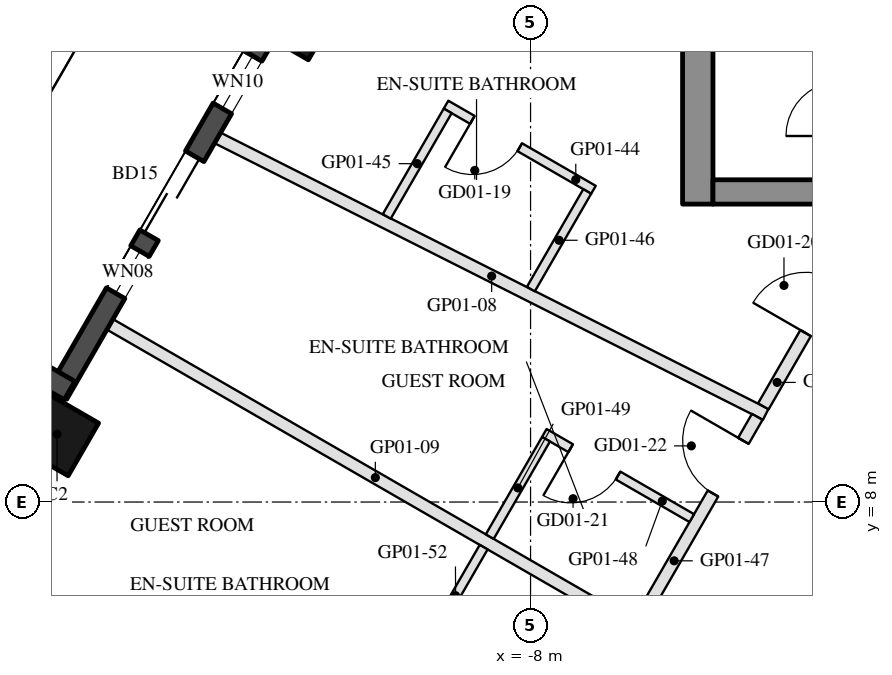
"""IFC4 building model, lengths in metres.
Left out: names, types, materials, properties, quantities, classifications, styles, units other than length and angle.
Written with IfcOpenShell. Run it as: python <this file> out.ifc"""

import sys

from ifc_helpers import new_model, si_unit, direction, frame, frame_2d, origin, origin_2d, place, context, subcontext, project, spatial, rectangle, hollow_rectangle, extrude, element, fill, save


model = new_model("IFC4")
c1 = context("Model", 3, precision=1e-05, world=origin(), true_north=direction((0.0, 1.0)))
c2 = subcontext(c1, "Body", "Model", "MODEL_VIEW")
j1 = project(units=[si_unit("LENGTHUNIT", "METRE"), si_unit("PLANEANGLEUNIT", "RADIAN")], contexts=[c1])
p1 = place(None, origin())
s1 = spatial("IfcSite", under=j1, at=p1, CompositionType="ELEMENT")
p2 = place(p1, origin())
s2 = spatial("IfcBuilding", under=s1, at=p2, CompositionType="ELEMENT")
p3 = place(p2, frame((0.0, 0.0, 46.5)))
s3 = spatial("IfcBuildingStorey", under=s2, at=p3, CompositionType="ELEMENT", Elevation=46.5)
for number, where, z_axis, x_axis in (
    (1, (-11.838, 15.957, 0.0), (0.0, 0.0, 1.0), (0.5, 0.866, 0.0)),
    (2, (-15.788, 9.115, 0.0), (0.0, 0.0, 1.0), (0.5, 0.866, 0.0)),
):
    element("IfcColumn", number, at=place(p3, frame(where, z_axis=z_axis, x_axis=x_axis)), inside=s3, PredefinedType="COLUMN", context=c2, shape_type="SweptSolid", body=[
        extrude(hollow_rectangle(XDim=1.0, YDim=1.0, WallThickness=0.045, at=origin_2d()), origin(), (0.0, 0.0, 1.0), 3.7),
    ])
p4 = place(p3, frame((-13.413, 16.029, 0.0), z_axis=(0.0, 0.0, 1.0), x_axis=(0.866005645448, -0.500034220881, 0.0)))
e3 = element("IfcWall", 3, at=p4, inside=s3, PredefinedType="SOLIDWALL", context=c2, shape_type="SweptSolid", body=[
    extrude(rectangle(XDim=1.22, YDim=0.35, at=frame_2d((0.61, 0.0))), origin(), (0.0, 0.0, 1.0), 3.55),
])
p5 = place(p3, frame((-12.409, 15.617, 0.0), z_axis=(0.0, 0.0, 1.0), x_axis=(-0.500003597184, -0.866023326939, 0.0)))
e4 = element("IfcWall", 4, at=p5, inside=s3, PredefinedType="SOLIDWALL", context=c2, shape_type="SweptSolid", body=[
    extrude(rectangle(XDim=6.74, YDim=0.35, at=frame_2d((3.37, 0.0))), origin(), (0.0, 0.0, 1.0), 3.55),
])
p6 = place(p5, frame((0.32, 0.0, 0.3)))
e5 = element("IfcOpeningElement", 5, at=p6, cuts=e4, PredefinedType="OPENING", context=c2, shape_type="SweptSolid", body=[
    extrude(rectangle(XDim=1.0, YDim=2.65, at=frame_2d((0.5, 1.325))), frame((0.0, 0.185, 0.0), z_axis=(0.0, -1.0, 0.0), x_axis=(1.0, 0.0, 0.0)), (0.0, 0.0, 1.0), 0.37),
])
p7 = place(p5, frame((2.229, 0.0, 0.0)))
e6 = element("IfcOpeningElement", 6, at=p7, cuts=e4, PredefinedType="OPENING", context=c2, shape_type="SweptSolid", body=[
    extrude(rectangle(XDim=1.5, YDim=2.4, at=frame_2d((0.75, 1.2))), frame((0.0, 0.185, 0.0), z_axis=(0.0, -1.0, 0.0), x_axis=(1.0, 0.0, 0.0)), (0.0, 0.0, 1.0), 0.37),
])
p8 = place(p5, frame((4.029, 0.0, 0.3)))
e7 = element("IfcOpeningElement", 7, at=p8, cuts=e4, PredefinedType="OPENING", context=c2, shape_type="SweptSolid", body=[
    extrude(rectangle(XDim=0.8, YDim=2.65, at=frame_2d((0.4, 1.325))), frame((0.0, 0.185, 0.0), z_axis=(0.0, -1.0, 0.0), x_axis=(1.0, 0.0, 0.0)), (0.0, 0.0, 1.0), 0.37),
])
p9 = place(p3, frame((-15.581, 9.833, 0.0), z_axis=(0.0, 0.0, 1.0), x_axis=(-0.866055662726, 0.499947586314, 0.0)))
e8 = element("IfcWall", 8, at=p9, inside=s3, PredefinedType="SOLIDWALL", context=c2, shape_type="SweptSolid", body=[
    extrude(rectangle(XDim=1.22, YDim=0.35, at=frame_2d((0.61, 0.0))), origin(), (0.0, 0.0, 1.0), 3.55),
])
p10 = place(p3, frame((-5.25, 12.9, 0.0), z_axis=(0.0, 0.0, 1.0), x_axis=(0.0, 1.0, 0.0)))
e9 = element("IfcWall", 9, at=p10, inside=s3, PredefinedType="SHEAR", context=c2, shape_type="SweptSolid", body=[
    extrude(rectangle(XDim=14.837, YDim=0.5, at=frame_2d((7.418, 0.0))), origin(), (0.0, 0.0, 1.0), 3.5),
])
p11 = place(p3, frame((5.0, 13.1, 0.0), z_axis=(0.0, 0.0, 1.0), x_axis=(-1.0, 0.0, 0.0)))
e10 = element("IfcWall", 10, at=p11, inside=s3, PredefinedType="SHEAR", context=c2, shape_type="SweptSolid", body=[
    extrude(rectangle(XDim=10.0, YDim=0.4, at=frame_2d((5.0, 0.0))), origin(), (0.0, 0.0, 1.0), 3.5),
])
p12 = place(p11, frame((3.55, 0.0, 0.0)))
e11 = element("IfcOpeningElement", 11, at=p12, cuts=e10, PredefinedType="OPENING", context=c2, shape_type="SweptSolid", body=[
    extrude(rectangle(XDim=1.1, YDim=2.1, at=frame_2d((0.55, 1.05))), frame((0.0, 0.21, 0.0), z_axis=(0.0, -1.0, 0.0), x_axis=(1.0, 0.0, 0.0)), (0.0, 0.0, 1.0), 0.42),
])
p13 = place(p11, frame((5.85, 0.0, 0.0)))
e12 = element("IfcOpeningElement", 12, at=p13, cuts=e10, PredefinedType="OPENING", context=c2, shape_type="SweptSolid", body=[
    extrude(rectangle(XDim=1.4, YDim=2.1, at=frame_2d((0.7, 1.05))), frame((0.0, 0.21, 0.0), z_axis=(0.0, -1.0, 0.0), x_axis=(1.0, 0.0, 0.0)), (0.0, 0.0, 1.0), 0.42),
])
p14 = place(p3, frame((-13.147, 13.989, 0.0), z_axis=(0.0, 0.0, 1.0), x_axis=(0.892898572595, -0.450257858408, 0.0)))
e13 = element("IfcWall", 13, at=p14, inside=s3, PredefinedType="PARTITIONING", context=c2, shape_type="SweptSolid", body=[
    extrude(rectangle(XDim=10.096, YDim=0.2, at=frame_2d((5.048, 0.0))), origin(), (0.0, 0.0, 1.0), 2.96),
])
p15 = place(p3, frame((-14.917, 10.922, 0.0), z_axis=(0.0, 0.0, 1.0), x_axis=(0.866022637375, -0.500004791531, 0.0)))
e14 = element("IfcWall", 14, at=p15, inside=s3, PredefinedType="PARTITIONING", context=c2, shape_type="SweptSolid", body=[
    extrude(rectangle(XDim=10.08, YDim=0.2, at=frame_2d((5.04, 0.0))), origin(), (0.0, 0.0, 1.0), 2.96),
])
p16 = place(p3, frame((-17.997, 7.388, 0.0), z_axis=(0.0, 0.0, 1.0), x_axis=(0.892478457214, -0.451090016968, 0.0)))
e15 = element("IfcWall", 15, at=p16, inside=s3, PredefinedType="PARTITIONING", context=c2, shape_type="SweptSolid", body=[
    extrude(rectangle(XDim=10.997, YDim=0.2, at=frame_2d((5.499, 0.0))), origin(), (0.0, 0.0, 1.0), 2.96),
])
p17 = place(p3, frame((-4.172, 9.574, 0.0), z_axis=(0.0, 0.0, 1.0), x_axis=(0.499985062256, 0.866034027923, 0.0)))
e16 = element("IfcWall", 16, at=p17, inside=s3, PredefinedType="PARTITIONING", context=c2, shape_type="SweptSolid", body=[
    extrude(rectangle(XDim=3.782, YDim=0.2, at=frame_2d((1.891, 0.0))), origin(), (0.0, 0.0, 1.0), 2.95),
])
p18 = place(p17, frame((1.391, 0.0, 0.0)))
e17 = element("IfcOpeningElement", 17, at=p18, cuts=e16, PredefinedType="OPENING", context=c2, shape_type="SweptSolid", body=[
    extrude(rectangle(XDim=1.0, YDim=2.1, at=frame_2d((0.5, 1.05))), frame((0.0, 0.11, 0.0), z_axis=(0.0, -1.0, 0.0), x_axis=(1.0, 0.0, 0.0)), (0.0, 0.0, 1.0), 0.22),
])
p19 = place(p3, frame((-6.965, 13.136, 0.0), z_axis=(0.0, 0.0, 1.0), x_axis=(-0.866034573852, 0.49998411664, 0.0)))
e18 = element("IfcWall", 18, at=p19, inside=s3, PredefinedType="PARTITIONING", context=c2, shape_type="SweptSolid", body=[
    extrude(rectangle(XDim=2.8, YDim=0.15, at=frame_2d((1.4, 0.0))), origin(), (0.0, 0.0, 1.0), 2.95),
])
p20 = place(p19, frame((1.4, 0.0, 0.0)))
e19 = element("IfcOpeningElement", 19, at=p20, cuts=e18, PredefinedType="OPENING", context=c2, shape_type="SweptSolid", body=[
    extrude(rectangle(XDim=0.9, YDim=2.1, at=frame_2d((0.45, 1.05))), frame((0.0, 0.085, 0.0), z_axis=(0.0, -1.0, 0.0), x_axis=(1.0, 0.0, 0.0)), (0.0, 0.0, 1.0), 0.17),
])
p21 = place(p3, frame((-9.363, 14.433, 0.0), z_axis=(0.0, 0.0, 1.0), x_axis=(-0.500056363668, -0.86599285976, 0.0)))
e20 = element("IfcWall", 20, at=p21, inside=s3, PredefinedType="PARTITIONING", context=c2, shape_type="SweptSolid", body=[
    extrude(rectangle(XDim=2.004, YDim=0.15, at=frame_2d((1.002, 0.0))), origin(), (0.0, 0.0, 1.0), 2.95),
])
p22 = place(p3, frame((-7.068, 13.108, 0.0), z_axis=(0.0, 0.0, 1.0), x_axis=(-0.4999770169, -0.866038672677, 0.0)))
e21 = element("IfcWall", 21, at=p22, inside=s3, PredefinedType="PARTITIONING", context=c2, shape_type="SweptSolid", body=[
    extrude(rectangle(XDim=1.854, YDim=0.15, at=frame_2d((0.927, 0.0))), origin(), (0.0, 0.0, 1.0), 2.95),
])
p23 = place(p3, frame((-6.225, 6.019, 0.0), z_axis=(0.0, 0.0, 1.0), x_axis=(0.499998439657, 0.866026304647, 0.0)))
e22 = element("IfcWall", 22, at=p23, inside=s3, PredefinedType="PARTITIONING", context=c2, shape_type="SweptSolid", body=[
    extrude(rectangle(XDim=3.905, YDim=0.2, at=frame_2d((1.953, 0.0))), origin(), (0.0, 0.0, 1.0), 2.95),
])
p24 = place(p23, frame((2.45, 0.0, 0.0)))
e23 = element("IfcOpeningElement", 23, at=p24, cuts=e22, PredefinedType="OPENING", context=c2, shape_type="SweptSolid", body=[
    extrude(rectangle(XDim=1.0, YDim=2.1, at=frame_2d((0.5, 1.05))), frame((0.0, 0.11, 0.0), z_axis=(0.0, -1.0, 0.0), x_axis=(1.0, 0.0, 0.0)), (0.0, 0.0, 1.0), 0.22),
])
p25 = place(p3, frame((-5.349, 7.736, 0.0), z_axis=(0.0, 0.0, 1.0), x_axis=(-0.866056369097, 0.49994636267, 0.0)))
e24 = element("IfcWall", 24, at=p25, inside=s3, PredefinedType="PARTITIONING", context=c2, shape_type="SweptSolid", body=[
    extrude(rectangle(XDim=2.8, YDim=0.15, at=frame_2d((1.4, 0.0))), origin(), (0.0, 0.0, 1.0), 2.95),
])
p26 = place(p25, frame((1.4, 0.0, 0.0)))
e25 = element("IfcOpeningElement", 25, at=p26, cuts=e24, PredefinedType="OPENING", context=c2, shape_type="SweptSolid", body=[
    extrude(rectangle(XDim=0.9, YDim=2.1, at=frame_2d((0.45, 1.05))), frame((0.0, 0.085, 0.0), z_axis=(0.0, -1.0, 0.0), x_axis=(1.0, 0.0, 0.0)), (0.0, 0.0, 1.0), 0.17),
])
p27 = place(p3, frame((-7.746, 9.033, 0.0), z_axis=(0.0, 0.0, 1.0), x_axis=(-0.500042316284, -0.866000971088, 0.0)))
e26 = element("IfcWall", 26, at=p27, inside=s3, PredefinedType="PARTITIONING", context=c2, shape_type="SweptSolid", body=[
    extrude(rectangle(XDim=1.85, YDim=0.15, at=frame_2d((0.925, 0.0))), origin(), (0.0, 0.0, 1.0), 2.95),
])
p28 = place(p3, frame((-8.771, 7.258, 0.0), z_axis=(0.0, 0.0, 1.0), x_axis=(-0.500154078321, -0.865936428347, 0.0)))
e27 = element("IfcWall", 27, at=p28, inside=s3, PredefinedType="PARTITIONING", context=c2, shape_type="SweptSolid", body=[
    extrude(rectangle(XDim=1.844, YDim=0.15, at=frame_2d((0.922, 0.0))), origin(), (0.0, 0.0, 1.0), 2.95),
])
p29 = place(p6, origin())
e28 = element("IfcWindow", 28, at=p29, inside=s3, PartitioningType="SINGLE_PANEL", PredefinedType="WINDOW", context=c2, shape_type="SweptSolid", body=[
    extrude(rectangle(XDim=1.0, YDim=2.65, at=frame_2d((0.5, 1.325))), frame((0.0, 0.03, 0.0), z_axis=(0.0, -1.0, 0.0), x_axis=(1.0, 0.0, 0.0)), (0.0, 0.0, 1.0), 0.06),
])
fill(e5, e28)
p30 = place(p7, frame((1.5, 0.0, 0.0), z_axis=(0.0, 0.0, 1.0), x_axis=(-1.0, 0.0, 0.0)))
e29 = element("IfcDoor", 29, at=p30, inside=s3, OperationType="SLIDING_TO_LEFT", PredefinedType="DOOR", context=c2, shape_type="SweptSolid", body=[
    extrude(rectangle(XDim=1.5, YDim=2.4, at=frame_2d((0.75, 1.2))), frame((0.0, 0.025, 0.0), z_axis=(0.0, -1.0, 0.0), x_axis=(1.0, 0.0, 0.0)), (0.0, 0.0, 1.0), 0.05),
])
fill(e6, e29)
p31 = place(p8, origin())
e30 = element("IfcWindow", 30, at=p31, inside=s3, PartitioningType="SINGLE_PANEL", PredefinedType="WINDOW", context=c2, shape_type="SweptSolid", body=[
    extrude(rectangle(XDim=0.8, YDim=2.65, at=frame_2d((0.4, 1.325))), frame((0.0, 0.03, 0.0), z_axis=(0.0, -1.0, 0.0), x_axis=(1.0, 0.0, 0.0)), (0.0, 0.0, 1.0), 0.06),
])
fill(e7, e30)
p32 = place(p20, origin())
e31 = element("IfcDoor", 31, at=p32, inside=s3, OperationType="SINGLE_SWING_RIGHT", PredefinedType="DOOR", context=c2, shape_type="SweptSolid", body=[
    extrude(rectangle(XDim=0.9, YDim=2.1, at=frame_2d((0.45, 1.05))), frame((0.0, 0.025, 0.0), z_axis=(0.0, -1.0, 0.0), x_axis=(1.0, 0.0, 0.0)), (0.0, 0.0, 1.0), 0.05),
])
fill(e19, e31)
p33 = place(p18, origin())
e32 = element("IfcDoor", 32, at=p33, inside=s3, OperationType="SINGLE_SWING_LEFT", PredefinedType="DOOR", context=c2, shape_type="SweptSolid", body=[
    extrude(rectangle(XDim=1.0, YDim=2.1, at=frame_2d((0.5, 1.05))), frame((0.0, 0.025, 0.0), z_axis=(0.0, -1.0, 0.0), x_axis=(1.0, 0.0, 0.0)), (0.0, 0.0, 1.0), 0.05),
])
fill(e17, e32)
p34 = place(p26, origin())
e33 = element("IfcDoor", 33, at=p34, inside=s3, OperationType="SINGLE_SWING_RIGHT", PredefinedType="DOOR", context=c2, shape_type="SweptSolid", body=[
    extrude(rectangle(XDim=0.9, YDim=2.1, at=frame_2d((0.45, 1.05))), frame((0.0, 0.025, 0.0), z_axis=(0.0, -1.0, 0.0), x_axis=(1.0, 0.0, 0.0)), (0.0, 0.0, 1.0), 0.05),
])
fill(e25, e33)
p35 = place(p24, origin())
e34 = element("IfcDoor", 34, at=p35, inside=s3, OperationType="SINGLE_SWING_RIGHT", PredefinedType="DOOR", context=c2, shape_type="SweptSolid", body=[
    extrude(rectangle(XDim=1.0, YDim=2.1, at=frame_2d((0.5, 1.05))), frame((0.0, 0.025, 0.0), z_axis=(0.0, -1.0, 0.0), x_axis=(1.0, 0.0, 0.0)), (0.0, 0.0, 1.0), 0.05),
])
fill(e23, e34)
save(model, sys.argv[1])
